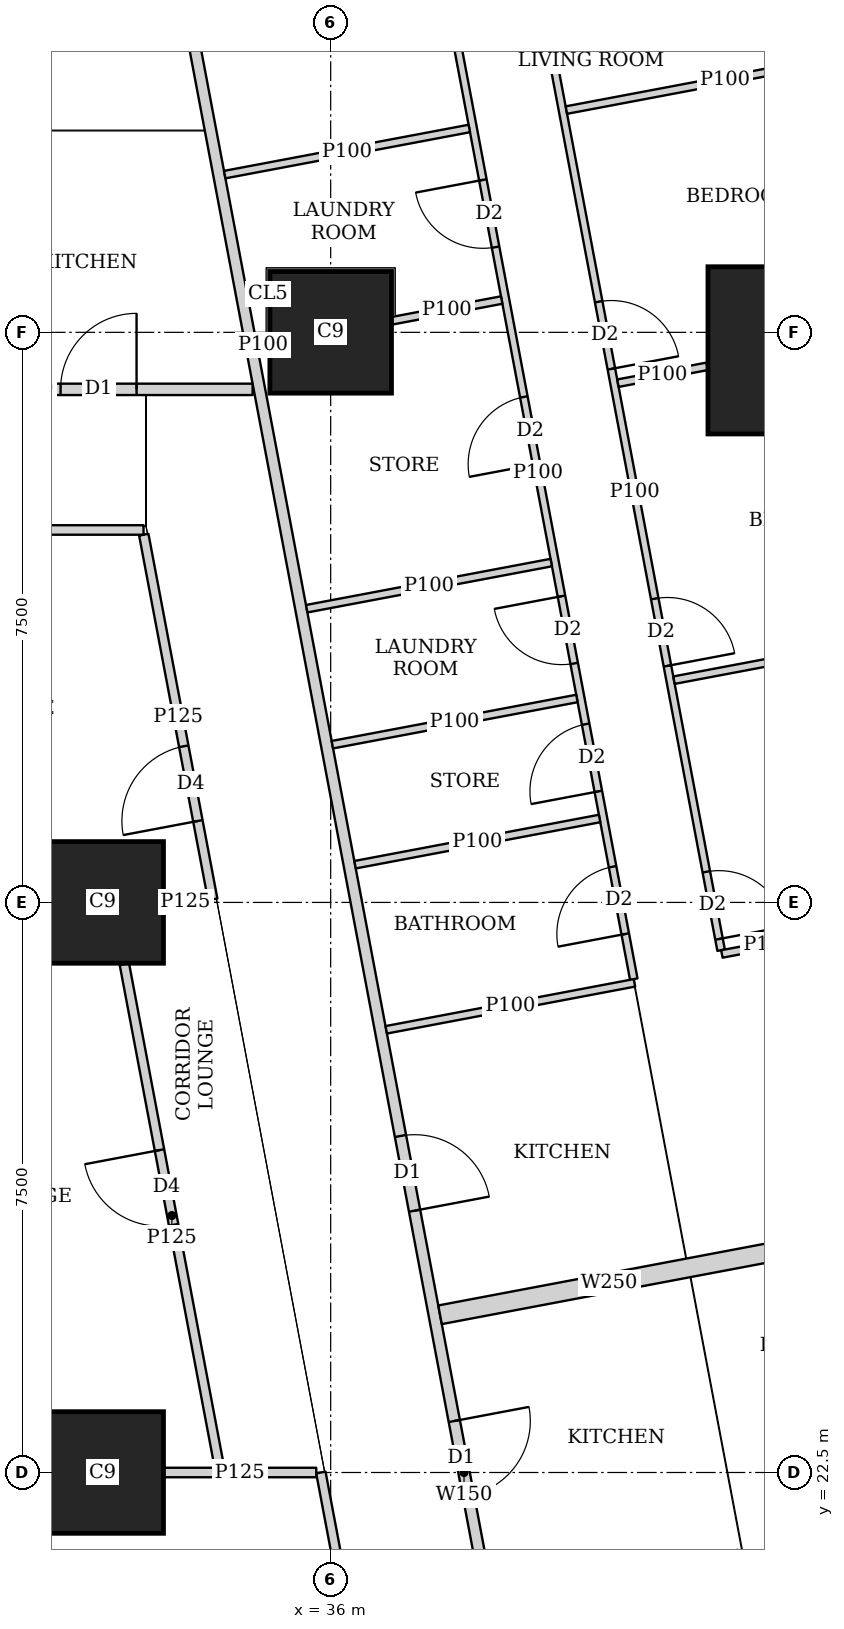
"""IFC4 building model, lengths in metres.
Left out: names, types, materials, properties, quantities, classifications, styles, units other than length and angle.
Written with IfcOpenShell. Run it as: python <this file> out.ifc"""

import sys

from ifc_helpers import new_model, si_unit, direction, frame, frame_2d, origin, origin_2d, place, context, subcontext, project, spatial, rectangle, extrude, element, fill, save


model = new_model("IFC4")
c1 = context("Model", 3, precision=1e-05, world=origin(), true_north=direction((0.0, 1.0)))
c2 = subcontext(c1, "Body", "Model", "MODEL_VIEW")
j1 = project(units=[si_unit("LENGTHUNIT", "METRE"), si_unit("PLANEANGLEUNIT", "RADIAN")], contexts=[c1])
p1 = place(None, origin())
s1 = spatial("IfcSite", under=j1, at=p1, CompositionType="ELEMENT")
p2 = place(p1, origin())
s2 = spatial("IfcBuilding", under=s1, at=p2, CompositionType="ELEMENT")
p3 = place(p2, frame((0.0, 0.0, 81.65)))
s3 = spatial("IfcBuildingStorey", under=s2, at=p3, CompositionType="ELEMENT", Elevation=81.65)
for number, where, z_axis, x_axis in (
    (1, (33.0, 22.5, 0.0), (0.0, 0.0, 1.0), (1.0, 0.0, 0.0)),
    (2, (33.0, 30.0, 0.0), (0.0, 0.0, 1.0), (1.0, 0.0, 0.0)),
    (3, (36.0, 37.5, 0.0), (0.0, 0.0, 1.0), (1.0, 0.0, 0.0)),
):
    element("IfcColumn", number, at=place(p3, frame(where, z_axis=z_axis, x_axis=x_axis)), inside=s3, PredefinedType="COLUMN", context=c2, shape_type="SweptSolid", body=[
        extrude(rectangle(XDim=1.6, YDim=1.6, at=origin_2d()), origin(), (0.0, 0.0, 1.0), 3.75),
    ])
p4 = place(p3, frame((42.064, 37.263, 0.0), z_axis=(0.0, 0.0, 1.0), x_axis=(1.0, 0.0, 0.0)))
e4 = element("IfcColumn", 4, at=p4, inside=s3, PredefinedType="COLUMN", context=c2, shape_type="SweptSolid", body=[
    extrude(rectangle(XDim=2.2, YDim=2.2, at=origin_2d()), origin(), (0.0, 0.0, 1.0), 3.75),
])
p5 = place(p3, frame((29.601, 36.75, 0.0), z_axis=(0.0, 0.0, 1.0), x_axis=(1.0, 0.0, 0.0)))
e5 = element("IfcWall", 5, at=p5, inside=s3, PredefinedType="SOLIDWALL", context=c2, shape_type="SweptSolid", body=[
    extrude(rectangle(XDim=5.372, YDim=0.15, at=frame_2d((2.686, 0.0))), origin(), (0.0, 0.0, 1.0), 3.5),
])
p6 = place(p5, frame((2.845, 0.0, 0.0)))
e6 = element("IfcOpeningElement", 6, at=p6, cuts=e5, PredefinedType="OPENING", context=c2, shape_type="SweptSolid", body=[
    extrude(rectangle(XDim=1.0, YDim=2.1, at=frame_2d((0.5, 1.05))), frame((0.0, 0.085, 0.0), z_axis=(0.0, -1.0, 0.0), x_axis=(1.0, 0.0, 0.0)), (0.0, 0.0, 1.0), 0.17),
])
p7 = place(p3, frame((33.382, 45.65, 0.0), z_axis=(0.0, 0.0, 1.0), x_axis=(0.185593544777, -0.982626600565, 0.0)))
e7 = element("IfcWall", 7, at=p7, inside=s3, PredefinedType="SOLIDWALL", context=c2, shape_type="SweptSolid", body=[
    extrude(rectangle(XDim=47.118, YDim=0.15, at=frame_2d((23.559, 0.0))), origin(), (0.0, 0.0, 1.0), 2.2),
])
p8 = place(p7, frame((19.054, 0.0, 0.0)))
e8 = element("IfcOpeningElement", 8, at=p8, cuts=e7, PredefinedType="OPENING", context=c2, shape_type="SweptSolid", body=[
    extrude(rectangle(XDim=1.0, YDim=2.1, at=frame_2d((0.5, 1.05))), frame((0.0, 0.085, 0.0), z_axis=(0.0, -1.0, 0.0), x_axis=(1.0, 0.0, 0.0)), (0.0, 0.0, 1.0), 0.17),
])
p9 = place(p7, frame((22.87, 0.0, 0.0)))
e9 = element("IfcOpeningElement", 9, at=p9, cuts=e7, PredefinedType="OPENING", context=c2, shape_type="SweptSolid", body=[
    extrude(rectangle(XDim=1.0, YDim=2.1, at=frame_2d((0.5, 1.05))), frame((0.0, 0.085, 0.0), z_axis=(0.0, -1.0, 0.0), x_axis=(1.0, 0.0, 0.0)), (0.0, 0.0, 1.0), 0.17),
])
p10 = place(p7, frame((33.833, 0.0, 0.0)))
e10 = element("IfcOpeningElement", 10, at=p10, cuts=e7, PredefinedType="OPENING", context=c2, shape_type="SweptSolid", body=[
    extrude(rectangle(XDim=1.0, YDim=2.1, at=frame_2d((0.5, 1.05))), frame((0.0, 0.085, 0.0), z_axis=(0.0, -1.0, 0.0), x_axis=(1.0, 0.0, 0.0)), (0.0, 0.0, 1.0), 0.17),
])
p11 = place(p3, frame((38.862, 41.42, 0.0), z_axis=(0.0, 0.0, 1.0), x_axis=(0.185529020159, -0.982638785454, 0.0)))
e11 = element("IfcWall", 11, at=p11, inside=s3, PredefinedType="PARTITIONING", context=c2, shape_type="SweptSolid", body=[
    extrude(rectangle(XDim=12.262, YDim=0.1, at=frame_2d((6.131, 0.0))), origin(), (0.0, 0.0, 1.0), 2.5),
])
p12 = place(p11, frame((11.212, 0.0, 0.0)))
e12 = element("IfcOpeningElement", 12, at=p12, cuts=e11, PredefinedType="OPENING", context=c2, shape_type="SweptSolid", body=[
    extrude(rectangle(XDim=0.9, YDim=2.1, at=frame_2d((0.45, 1.05))), frame((0.0, 0.06, 0.0), z_axis=(0.0, -1.0, 0.0), x_axis=(1.0, 0.0, 0.0)), (0.0, 0.0, 1.0), 0.12),
])
p13 = place(p11, frame((7.555, 0.0, 0.0)))
e13 = element("IfcOpeningElement", 13, at=p13, cuts=e11, PredefinedType="OPENING", context=c2, shape_type="SweptSolid", body=[
    extrude(rectangle(XDim=0.9, YDim=2.1, at=frame_2d((0.45, 1.05))), frame((0.0, 0.06, 0.0), z_axis=(0.0, -1.0, 0.0), x_axis=(1.0, 0.0, 0.0)), (0.0, 0.0, 1.0), 0.12),
])
p14 = place(p11, frame((3.579, 0.0, 0.0)))
e14 = element("IfcOpeningElement", 14, at=p14, cuts=e11, PredefinedType="OPENING", context=c2, shape_type="SweptSolid", body=[
    extrude(rectangle(XDim=0.9, YDim=2.1, at=frame_2d((0.45, 1.05))), frame((0.0, 0.06, 0.0), z_axis=(0.0, -1.0, 0.0), x_axis=(1.0, 0.0, 0.0)), (0.0, 0.0, 1.0), 0.12),
])
p15 = place(p3, frame((37.473, 42.309, 0.0), z_axis=(0.0, 0.0, 1.0), x_axis=(0.185570636839, -0.982630927024, 0.0)))
e15 = element("IfcWall", 15, at=p15, inside=s3, PredefinedType="PARTITIONING", context=c2, shape_type="SweptSolid", body=[
    extrude(rectangle(XDim=13.553, YDim=0.1, at=frame_2d((6.777, 0.0))), origin(), (0.0, 0.0, 1.0), 2.5),
])
p16 = place(p15, frame((12.049, 0.0, 0.0)))
e16 = element("IfcOpeningElement", 16, at=p16, cuts=e15, PredefinedType="OPENING", context=c2, shape_type="SweptSolid", body=[
    extrude(rectangle(XDim=0.9, YDim=2.1, at=frame_2d((0.45, 1.05))), frame((0.0, 0.06, 0.0), z_axis=(0.0, -1.0, 0.0), x_axis=(1.0, 0.0, 0.0)), (0.0, 0.0, 1.0), 0.12),
])
p17 = place(p15, frame((8.427, 0.0, 0.0)))
e17 = element("IfcOpeningElement", 17, at=p17, cuts=e15, PredefinedType="OPENING", context=c2, shape_type="SweptSolid", body=[
    extrude(rectangle(XDim=0.9, YDim=2.1, at=frame_2d((0.45, 1.05))), frame((0.0, 0.06, 0.0), z_axis=(0.0, -1.0, 0.0), x_axis=(1.0, 0.0, 0.0)), (0.0, 0.0, 1.0), 0.12),
])
p18 = place(p15, frame((2.853, 0.0, 0.0)))
e18 = element("IfcOpeningElement", 18, at=p18, cuts=e15, PredefinedType="OPENING", context=c2, shape_type="SweptSolid", body=[
    extrude(rectangle(XDim=0.9, YDim=2.1, at=frame_2d((0.45, 1.05))), frame((0.0, 0.06, 0.0), z_axis=(0.0, -1.0, 0.0), x_axis=(1.0, 0.0, 0.0)), (0.0, 0.0, 1.0), 0.12),
])
p19 = place(p15, frame((10.14, 0.0, 0.0)))
e19 = element("IfcOpeningElement", 19, at=p19, cuts=e15, PredefinedType="OPENING", context=c2, shape_type="SweptSolid", body=[
    extrude(rectangle(XDim=0.9, YDim=2.1, at=frame_2d((0.45, 1.05))), frame((0.0, 0.06, 0.0), z_axis=(0.0, -1.0, 0.0), x_axis=(1.0, 0.0, 0.0)), (0.0, 0.0, 1.0), 0.12),
])
p20 = place(p15, frame((5.759, 0.0, 0.0)))
e20 = element("IfcOpeningElement", 20, at=p20, cuts=e15, PredefinedType="OPENING", context=c2, shape_type="SweptSolid", body=[
    extrude(rectangle(XDim=0.9, YDim=2.1, at=frame_2d((0.45, 1.05))), frame((0.0, 0.06, 0.0), z_axis=(0.0, -1.0, 0.0), x_axis=(1.0, 0.0, 0.0)), (0.0, 0.0, 1.0), 0.12),
])
p21 = place(p3, frame((43.277, 41.212, 0.0), z_axis=(0.0, 0.0, 1.0), x_axis=(-0.982665405803, -0.185387972203, 0.0)))
e21 = element("IfcWall", 21, at=p21, inside=s3, PredefinedType="PARTITIONING", context=c2, shape_type="SweptSolid", body=[
    extrude(rectangle(XDim=4.25, YDim=0.1, at=frame_2d((2.125, 0.0))), origin(), (0.0, 0.0, 1.0), 2.05),
])
p22 = place(p3, frame((40.954, 37.053, 0.0), z_axis=(0.0, 0.0, 1.0), x_axis=(-0.982628652346, -0.185582681276, 0.0)))
e22 = element("IfcWall", 22, at=p22, inside=s3, PredefinedType="PARTITIONING", context=c2, shape_type="SweptSolid", body=[
    extrude(rectangle(XDim=1.196, YDim=0.1, at=frame_2d((0.598, 0.0))), origin(), (0.0, 0.0, 1.0), 2.05),
])
p23 = place(p3, frame((44.693, 33.713, 0.0), z_axis=(0.0, 0.0, 1.0), x_axis=(-0.982623519589, -0.185609856287, 0.0)))
e23 = element("IfcWall", 23, at=p23, inside=s3, PredefinedType="PARTITIONING", context=c2, shape_type="SweptSolid", body=[
    extrude(rectangle(XDim=4.25, YDim=0.1, at=frame_2d((2.125, 0.0))), origin(), (0.0, 0.0, 1.0), 2.2),
])
p24 = place(p3, frame((42.37, 29.553, 0.0), z_axis=(0.0, 0.0, 1.0), x_axis=(-0.98263602344, -0.185543648338, 0.0)))
e24 = element("IfcWall", 24, at=p24, inside=s3, PredefinedType="PARTITIONING", context=c2, shape_type="SweptSolid", body=[
    extrude(rectangle(XDim=1.245, YDim=0.1, at=frame_2d((0.623, 0.0))), origin(), (0.0, 0.0, 1.0), 2.5),
])
p25 = place(p3, frame((37.824, 40.182, 0.0), z_axis=(0.0, 0.0, 1.0), x_axis=(-0.982674977865, -0.185337227447, 0.0)))
e25 = element("IfcWall", 25, at=p25, inside=s3, PredefinedType="PARTITIONING", context=c2, shape_type="SweptSolid", body=[
    extrude(rectangle(XDim=3.275, YDim=0.1, at=frame_2d((1.637, 0.0))), origin(), (0.0, 0.0, 1.0), 3.5),
])
p26 = place(p3, frame((38.25, 37.925, 0.0), z_axis=(0.0, 0.0, 1.0), x_axis=(-0.982626127294, -0.185596050493, 0.0)))
e26 = element("IfcWall", 26, at=p26, inside=s3, PredefinedType="PARTITIONING", context=c2, shape_type="SweptSolid", body=[
    extrude(rectangle(XDim=1.465, YDim=0.1, at=frame_2d((0.733, 0.0))), origin(), (0.0, 0.0, 1.0), 3.5),
])
p27 = place(p3, frame((35.19, 37.347, 0.0), z_axis=(0.0, 0.0, 1.0), x_axis=(-0.982404955251, -0.186763229514, 0.0)))
e27 = element("IfcWall", 27, at=p27, inside=s3, PredefinedType="PARTITIONING", context=c2, shape_type="SweptSolid", body=[
    extrude(rectangle(XDim=0.161, YDim=0.1, at=frame_2d((0.081, 0.0))), origin(), (0.0, 0.0, 1.0), 3.5),
])
p28 = place(p3, frame((39.24, 32.683, 0.0), z_axis=(0.0, 0.0, 1.0), x_axis=(-0.982607026909, -0.185697147715, 0.0)))
e28 = element("IfcWall", 28, at=p28, inside=s3, PredefinedType="PARTITIONING", context=c2, shape_type="SweptSolid", body=[
    extrude(rectangle(XDim=3.275, YDim=0.1, at=frame_2d((1.637, 0.0))), origin(), (0.0, 0.0, 1.0), 3.5),
])
p29 = place(p3, frame((39.997, 28.942, 0.0), z_axis=(0.0, 0.0, 1.0), x_axis=(-0.982569883123, -0.185893584556, 0.0)))
e29 = element("IfcWall", 29, at=p29, inside=s3, PredefinedType="PARTITIONING", context=c2, shape_type="SweptSolid", body=[
    extrude(rectangle(XDim=3.324, YDim=0.1, at=frame_2d((1.662, 0.0))), origin(), (0.0, 0.0, 1.0), 3.5),
])
p30 = place(p3, frame((39.538, 31.104, 0.0), z_axis=(0.0, 0.0, 1.0), x_axis=(-0.982610347627, -0.185679575441, 0.0)))
e30 = element("IfcWall", 30, at=p30, inside=s3, PredefinedType="PARTITIONING", context=c2, shape_type="SweptSolid", body=[
    extrude(rectangle(XDim=3.274, YDim=0.1, at=frame_2d((1.637, 0.0))), origin(), (0.0, 0.0, 1.0), 2.5),
])
p31 = place(p3, frame((38.902, 34.471, 0.0), z_axis=(0.0, 0.0, 1.0), x_axis=(-0.982664729897, -0.18539155487, 0.0)))
e31 = element("IfcWall", 31, at=p31, inside=s3, PredefinedType="PARTITIONING", context=c2, shape_type="SweptSolid", body=[
    extrude(rectangle(XDim=3.274, YDim=0.1, at=frame_2d((1.637, 0.0))), origin(), (0.0, 0.0, 1.0), 3.5),
])
p32 = place(p3, frame((41.885, 25.415, 0.0), z_axis=(0.0, 0.0, 1.0), x_axis=(-0.982612837616, -0.185666398014, 0.0)))
e32 = element("IfcWall", 32, at=p32, inside=s3, PredefinedType="SOLIDWALL", context=c2, shape_type="SweptSolid", body=[
    extrude(rectangle(XDim=4.525, YDim=0.25, at=frame_2d((2.262, 0.0))), origin(), (0.0, 0.0, 1.0), 3.5),
])
p33 = place(p3, frame((28.95, 34.9, 0.0), z_axis=(0.0, 0.0, 1.0), x_axis=(1.0, 0.0, 0.0)))
e33 = element("IfcWall", 33, at=p33, inside=s3, PredefinedType="PARTITIONING", context=c2, shape_type="SweptSolid", body=[
    extrude(rectangle(XDim=4.588, YDim=0.125, at=frame_2d((2.294, 0.0))), origin(), (0.0, 0.0, 1.0), 3.5),
])
p34 = place(p3, frame((38.202, 10.163, 0.0), z_axis=(0.0, 0.0, 1.0), x_axis=(-0.185645577403, 0.982616771479, 0.0)))
e34 = element("IfcWall", 34, at=p34, inside=s3, PredefinedType="PARTITIONING", context=c2, shape_type="SweptSolid", body=[
    extrude(rectangle(XDim=12.555, YDim=0.125, at=frame_2d((6.278, 0.0))), origin(), (0.0, 0.0, 1.0), 2.5),
])
p35 = place(p34, frame((0.708, 0.0, 0.0)))
e35 = element("IfcOpeningElement", 35, at=p35, cuts=e34, PredefinedType="OPENING", context=c2, shape_type="SweptSolid", body=[
    extrude(rectangle(XDim=1.0, YDim=2.1, at=frame_2d((0.5, 1.05))), frame((0.0, 0.073, 0.0), z_axis=(0.0, -1.0, 0.0), x_axis=(1.0, 0.0, 0.0)), (0.0, 0.0, 1.0), 0.145),
])
p36 = place(p34, frame((6.0, 0.0, 0.0)))
e36 = element("IfcOpeningElement", 36, at=p36, cuts=e34, PredefinedType="OPENING", context=c2, shape_type="SweptSolid", body=[
    extrude(rectangle(XDim=1.0, YDim=2.1, at=frame_2d((0.5, 1.05))), frame((0.0, 0.073, 0.0), z_axis=(0.0, -1.0, 0.0), x_axis=(1.0, 0.0, 0.0)), (0.0, 0.0, 1.0), 0.145),
])
p37 = place(p34, frame((9.562, 0.0, 0.0)))
e37 = element("IfcOpeningElement", 37, at=p37, cuts=e34, PredefinedType="OPENING", context=c2, shape_type="SweptSolid", body=[
    extrude(rectangle(XDim=1.0, YDim=2.1, at=frame_2d((0.5, 1.05))), frame((0.0, 0.073, 0.0), z_axis=(0.0, -1.0, 0.0), x_axis=(1.0, 0.0, 0.0)), (0.0, 0.0, 1.0), 0.145),
])
p38 = place(p3, frame((34.448, 30.04, 0.0), z_axis=(0.0, 0.0, 1.0), x_axis=(-0.185749459238, 0.982597139418, 0.0)))
e38 = element("IfcWall", 38, at=p38, inside=s3, PredefinedType="PARTITIONING", context=c2, shape_type="SweptSolid", body=[
    extrude(rectangle(XDim=4.883, YDim=0.125, at=frame_2d((2.441, 0.0))), origin(), (0.0, 0.0, 1.0), 2.5),
])
p39 = place(p38, frame((1.05, 0.0, 0.0)))
e39 = element("IfcOpeningElement", 39, at=p39, cuts=e38, PredefinedType="OPENING", context=c2, shape_type="SweptSolid", body=[
    extrude(rectangle(XDim=1.0, YDim=2.1, at=frame_2d((0.5, 1.05))), frame((0.0, 0.073, 0.0), z_axis=(0.0, -1.0, 0.0), x_axis=(1.0, 0.0, 0.0)), (0.0, 0.0, 1.0), 0.145),
])
p40 = place(p3, frame((34.535, 22.574, 0.0), z_axis=(0.0, 0.0, 1.0), x_axis=(-0.185591596381, 0.982626968566, 0.0)))
e40 = element("IfcWall", 40, at=p40, inside=s3, PredefinedType="PARTITIONING", context=c2, shape_type="SweptSolid", body=[
    extrude(rectangle(XDim=6.73, YDim=0.125, at=frame_2d((3.365, 0.0))), origin(), (0.0, 0.0, 1.0), 2.5),
])
p41 = place(p40, frame((3.241, 0.0, 0.0)))
e41 = element("IfcOpeningElement", 41, at=p41, cuts=e40, PredefinedType="OPENING", context=c2, shape_type="SweptSolid", body=[
    extrude(rectangle(XDim=1.0, YDim=2.1, at=frame_2d((0.5, 1.05))), frame((0.0, 0.073, 0.0), z_axis=(0.0, -1.0, 0.0), x_axis=(1.0, 0.0, 0.0)), (0.0, 0.0, 1.0), 0.145),
])
p42 = place(p3, frame((33.801, 22.5, 0.0), z_axis=(0.0, 0.0, 1.0), x_axis=(1.0, 0.0, 0.0)))
e42 = element("IfcWall", 42, at=p42, inside=s3, PredefinedType="PARTITIONING", context=c2, shape_type="SweptSolid", body=[
    extrude(rectangle(XDim=2.009, YDim=0.125, at=frame_2d((1.004, 0.0))), origin(), (0.0, 0.0, 1.0), 2.5),
])
p43 = place(p3, frame((33.801, 30.0, 0.0), z_axis=(0.0, 0.0, 1.0), x_axis=(1.0, 0.0, 0.0)))
e43 = element("IfcWall", 43, at=p43, inside=s3, PredefinedType="PARTITIONING", context=c2, shape_type="SweptSolid", body=[
    extrude(rectangle(XDim=0.579, YDim=0.125, at=frame_2d((0.29, 0.0))), origin(), (0.0, 0.0, 1.0), 2.5),
])
p44 = place(p12, origin())
e44 = element("IfcDoor", 44, at=p44, inside=s3, OperationType="SINGLE_SWING_RIGHT", PredefinedType="DOOR", context=c2, shape_type="SweptSolid", body=[
    extrude(rectangle(XDim=0.9, YDim=2.1, at=frame_2d((0.45, 1.05))), frame((0.0, 0.025, 0.0), z_axis=(0.0, -1.0, 0.0), x_axis=(1.0, 0.0, 0.0)), (0.0, 0.0, 1.0), 0.05),
])
fill(e12, e44)
p45 = place(p13, origin())
e45 = element("IfcDoor", 45, at=p45, inside=s3, OperationType="SINGLE_SWING_RIGHT", PredefinedType="DOOR", context=c2, shape_type="SweptSolid", body=[
    extrude(rectangle(XDim=0.9, YDim=2.1, at=frame_2d((0.45, 1.05))), frame((0.0, 0.025, 0.0), z_axis=(0.0, -1.0, 0.0), x_axis=(1.0, 0.0, 0.0)), (0.0, 0.0, 1.0), 0.05),
])
fill(e13, e45)
p46 = place(p14, origin())
e46 = element("IfcDoor", 46, at=p46, inside=s3, OperationType="SINGLE_SWING_RIGHT", PredefinedType="DOOR", context=c2, shape_type="SweptSolid", body=[
    extrude(rectangle(XDim=0.9, YDim=2.1, at=frame_2d((0.45, 1.05))), frame((0.0, 0.025, 0.0), z_axis=(0.0, -1.0, 0.0), x_axis=(1.0, 0.0, 0.0)), (0.0, 0.0, 1.0), 0.05),
])
fill(e14, e46)
p47 = place(p16, origin())
e47 = element("IfcDoor", 47, at=p47, inside=s3, OperationType="SINGLE_SWING_LEFT", PredefinedType="DOOR", context=c2, shape_type="SweptSolid", body=[
    extrude(rectangle(XDim=0.9, YDim=2.1, at=frame_2d((0.45, 1.05))), frame((0.0, 0.025, 0.0), z_axis=(0.0, -1.0, 0.0), x_axis=(1.0, 0.0, 0.0)), (0.0, 0.0, 1.0), 0.05),
])
fill(e16, e47)
p48 = place(p17, origin())
e48 = element("IfcDoor", 48, at=p48, inside=s3, OperationType="SINGLE_SWING_RIGHT", PredefinedType="DOOR", context=c2, shape_type="SweptSolid", body=[
    extrude(rectangle(XDim=0.9, YDim=2.1, at=frame_2d((0.45, 1.05))), frame((0.0, 0.025, 0.0), z_axis=(0.0, -1.0, 0.0), x_axis=(1.0, 0.0, 0.0)), (0.0, 0.0, 1.0), 0.05),
])
fill(e17, e48)
p49 = place(p18, origin())
e49 = element("IfcDoor", 49, at=p49, inside=s3, OperationType="SINGLE_SWING_RIGHT", PredefinedType="DOOR", context=c2, shape_type="SweptSolid", body=[
    extrude(rectangle(XDim=0.9, YDim=2.1, at=frame_2d((0.45, 1.05))), frame((0.0, 0.025, 0.0), z_axis=(0.0, -1.0, 0.0), x_axis=(1.0, 0.0, 0.0)), (0.0, 0.0, 1.0), 0.05),
])
fill(e18, e49)
p50 = place(p19, origin())
e50 = element("IfcDoor", 50, at=p50, inside=s3, OperationType="SINGLE_SWING_LEFT", PredefinedType="DOOR", context=c2, shape_type="SweptSolid", body=[
    extrude(rectangle(XDim=0.9, YDim=2.1, at=frame_2d((0.45, 1.05))), frame((0.0, 0.025, 0.0), z_axis=(0.0, -1.0, 0.0), x_axis=(1.0, 0.0, 0.0)), (0.0, 0.0, 1.0), 0.05),
])
fill(e19, e50)
p51 = place(p20, origin())
e51 = element("IfcDoor", 51, at=p51, inside=s3, OperationType="SINGLE_SWING_LEFT", PredefinedType="DOOR", context=c2, shape_type="SweptSolid", body=[
    extrude(rectangle(XDim=0.9, YDim=2.1, at=frame_2d((0.45, 1.05))), frame((0.0, 0.025, 0.0), z_axis=(0.0, -1.0, 0.0), x_axis=(1.0, 0.0, 0.0)), (0.0, 0.0, 1.0), 0.05),
])
fill(e20, e51)
p52 = place(p8, origin())
e52 = element("IfcDoor", 52, at=p52, inside=s3, OperationType="SINGLE_SWING_RIGHT", PredefinedType="DOOR", context=c2, shape_type="SweptSolid", body=[
    extrude(rectangle(XDim=1.0, YDim=2.1, at=frame_2d((0.5, 1.05))), frame((0.0, 0.025, 0.0), z_axis=(0.0, -1.0, 0.0), x_axis=(1.0, 0.0, 0.0)), (0.0, 0.0, 1.0), 0.05),
])
fill(e8, e52)
p53 = place(p9, origin())
e53 = element("IfcDoor", 53, at=p53, inside=s3, OperationType="SINGLE_SWING_LEFT", PredefinedType="DOOR", context=c2, shape_type="SweptSolid", body=[
    extrude(rectangle(XDim=1.0, YDim=2.1, at=frame_2d((0.5, 1.05))), frame((0.0, 0.025, 0.0), z_axis=(0.0, -1.0, 0.0), x_axis=(1.0, 0.0, 0.0)), (0.0, 0.0, 1.0), 0.05),
])
fill(e9, e53)
p54 = place(p6, origin())
e54 = element("IfcDoor", 54, at=p54, inside=s3, OperationType="SINGLE_SWING_RIGHT", PredefinedType="DOOR", context=c2, shape_type="SweptSolid", body=[
    extrude(rectangle(XDim=1.0, YDim=2.1, at=frame_2d((0.5, 1.05))), frame((0.0, 0.025, 0.0), z_axis=(0.0, -1.0, 0.0), x_axis=(1.0, 0.0, 0.0)), (0.0, 0.0, 1.0), 0.05),
])
fill(e6, e54)
p55 = place(p41, origin())
e55 = element("IfcDoor", 55, at=p55, inside=s3, OperationType="SINGLE_SWING_RIGHT", PredefinedType="DOOR", context=c2, shape_type="SweptSolid", body=[
    extrude(rectangle(XDim=1.0, YDim=2.1, at=frame_2d((0.5, 1.05))), frame((0.0, 0.025, 0.0), z_axis=(0.0, -1.0, 0.0), x_axis=(1.0, 0.0, 0.0)), (0.0, 0.0, 1.0), 0.05),
])
fill(e41, e55)
p56 = place(p39, origin())
e56 = element("IfcDoor", 56, at=p56, inside=s3, OperationType="SINGLE_SWING_LEFT", PredefinedType="DOOR", context=c2, shape_type="SweptSolid", body=[
    extrude(rectangle(XDim=1.0, YDim=2.1, at=frame_2d((0.5, 1.05))), frame((0.0, 0.025, 0.0), z_axis=(0.0, -1.0, 0.0), x_axis=(1.0, 0.0, 0.0)), (0.0, 0.0, 1.0), 0.05),
])
fill(e39, e56)
save(model, sys.argv[1])
